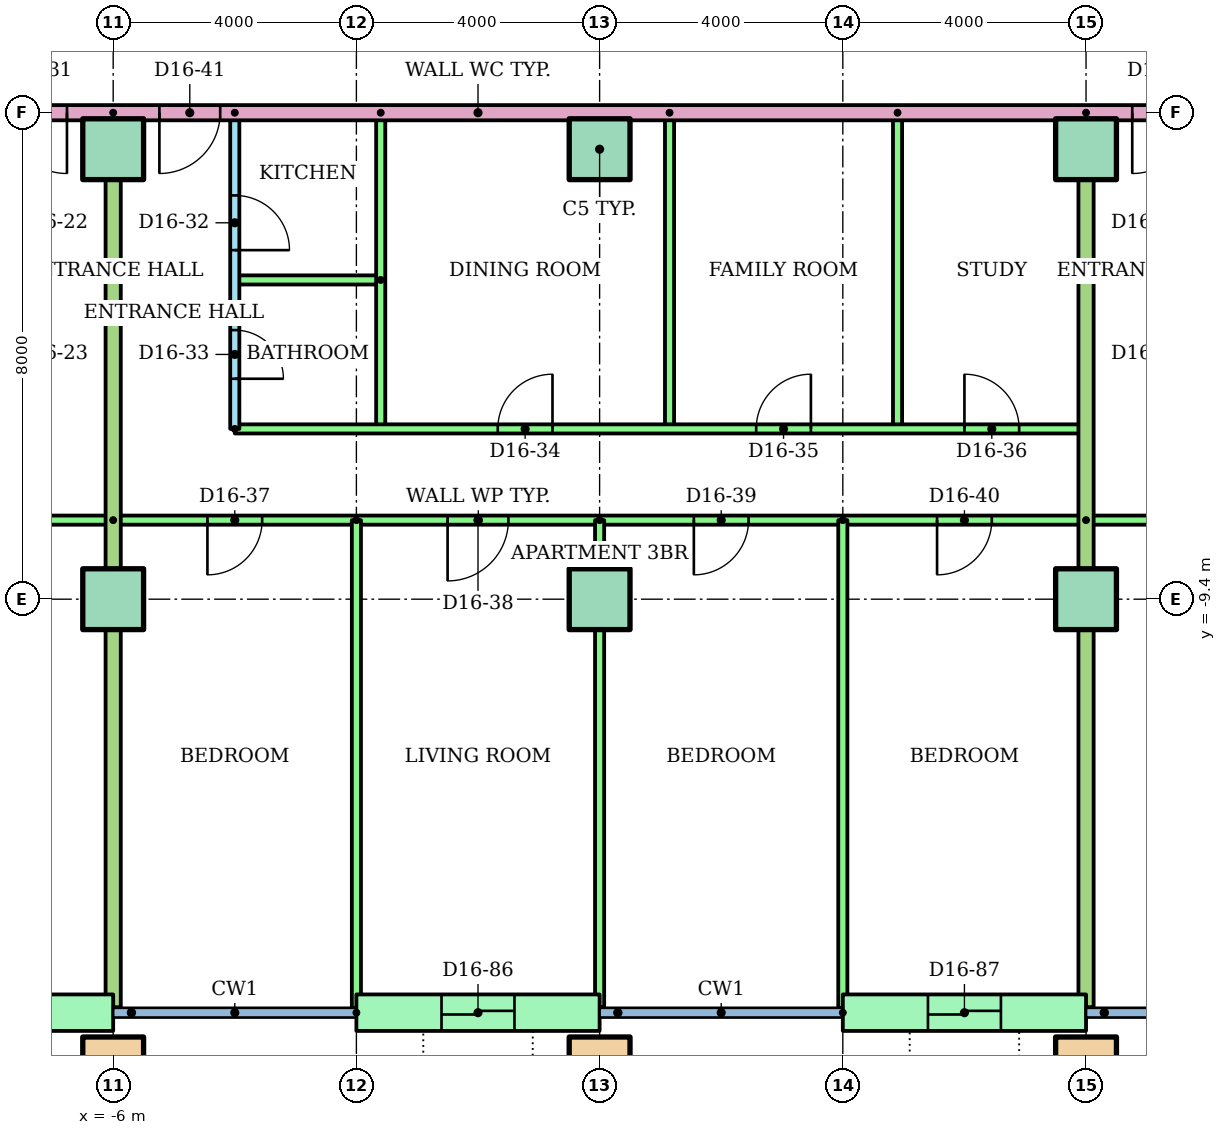
"""IFC4 building model, lengths in metres.
Left out: names, types, materials, properties, quantities, classifications, styles, units other than length and angle.
Written with IfcOpenShell. Run it as: python <this file> out.ifc"""

import sys

from ifc_helpers import new_model, si_unit, direction, frame, frame_2d, origin, origin_2d, place, context, subcontext, project, spatial, rectangle, hollow_rectangle, extrude, element, fill, save


model = new_model("IFC4")
c1 = context("Model", 3, precision=1e-05, world=origin(), true_north=direction((0.0, 1.0)))
c2 = subcontext(c1, "Body", "Model", "MODEL_VIEW")
j1 = project(units=[si_unit("LENGTHUNIT", "METRE"), si_unit("PLANEANGLEUNIT", "RADIAN")], contexts=[c1])
p1 = place(None, origin())
s1 = spatial("IfcSite", under=j1, at=p1, CompositionType="ELEMENT")
p2 = place(p1, origin())
s2 = spatial("IfcBuilding", under=s1, at=p2, CompositionType="ELEMENT")
p3 = place(p2, frame((0.0, 0.0, 60.8)))
s3 = spatial("IfcBuildingStorey", under=s2, at=p3, CompositionType="ELEMENT", Elevation=60.8)
for number, where in (
    (1, (-6.0, -17.1, 0.0)),
    (2, (2.0, -17.1, 0.0)),
    (3, (10.0, -17.1, 0.0)),
):
    element("IfcColumn", number, at=place(p3, frame(where)), inside=s3, PredefinedType="COLUMN", context=c2, shape_type="SweptSolid", body=[
        extrude(hollow_rectangle(XDim=1.0, YDim=1.0, WallThickness=0.05, at=origin_2d()), origin(), (0.0, 0.0, 1.0), 3.2),
    ])
for number, where in (
    (4, (-6.0, -9.4, 0.0)),
    (5, (2.0, -9.4, 0.0)),
    (6, (10.0, -9.4, 0.0)),
    (7, (-6.0, -2.0, 0.0)),
    (8, (2.0, -2.0, 0.0)),
    (9, (10.0, -2.0, 0.0)),
):
    element("IfcColumn", number, at=place(p3, frame(where)), inside=s3, PredefinedType="COLUMN", context=c2, shape_type="SweptSolid", body=[
        extrude(rectangle(XDim=1.0, YDim=1.0, at=origin_2d()), origin(), (0.0, 0.0, 1.0), 3.2),
    ])
p4 = place(p3, frame((-10.0, -16.2, 0.0)))
e10 = element("IfcWall", 10, at=p4, inside=s3, PredefinedType="STANDARD", context=c2, shape_type="SweptSolid", body=[
    extrude(rectangle(XDim=4.0, YDim=0.6, at=frame_2d((2.0, 0.0))), origin(), (0.0, 0.0, 1.0), 2.8),
])
p5 = place(p4, frame((1.4, 0.0, 0.0)))
e11 = element("IfcOpeningElement", 11, at=p5, cuts=e10, PredefinedType="OPENING", context=c2, shape_type="SweptSolid", body=[
    extrude(rectangle(XDim=1.2, YDim=2.1, at=frame_2d((0.6, 1.05))), frame((0.0, 0.31, 0.0), z_axis=(0.0, -1.0, 0.0), x_axis=(1.0, 0.0, 0.0)), (0.0, 0.0, 1.0), 0.62),
])
p6 = place(p3, frame((-2.0, -16.2, 0.0)))
e12 = element("IfcWall", 12, at=p6, inside=s3, PredefinedType="STANDARD", context=c2, shape_type="SweptSolid", body=[
    extrude(rectangle(XDim=4.0, YDim=0.6, at=frame_2d((2.0, 0.0))), origin(), (0.0, 0.0, 1.0), 2.8),
])
p7 = place(p6, frame((1.4, 0.0, 0.0)))
e13 = element("IfcOpeningElement", 13, at=p7, cuts=e12, PredefinedType="OPENING", context=c2, shape_type="SweptSolid", body=[
    extrude(rectangle(XDim=1.2, YDim=2.1, at=frame_2d((0.6, 1.05))), frame((0.0, 0.31, 0.0), z_axis=(0.0, -1.0, 0.0), x_axis=(1.0, 0.0, 0.0)), (0.0, 0.0, 1.0), 0.62),
])
p8 = place(p3, frame((6.0, -16.2, 0.0)))
e14 = element("IfcWall", 14, at=p8, inside=s3, PredefinedType="STANDARD", context=c2, shape_type="SweptSolid", body=[
    extrude(rectangle(XDim=4.0, YDim=0.6, at=frame_2d((2.0, 0.0))), origin(), (0.0, 0.0, 1.0), 2.8),
])
p9 = place(p8, frame((1.4, 0.0, 0.0)))
e15 = element("IfcOpeningElement", 15, at=p9, cuts=e14, PredefinedType="OPENING", context=c2, shape_type="SweptSolid", body=[
    extrude(rectangle(XDim=1.2, YDim=2.1, at=frame_2d((0.6, 1.05))), frame((0.0, 0.31, 0.0), z_axis=(0.0, -1.0, 0.0), x_axis=(1.0, 0.0, 0.0)), (0.0, 0.0, 1.0), 0.62),
])
p10 = place(p3, frame((-6.0, -8.1, 0.0), z_axis=(0.0, 0.0, 1.0), x_axis=(-1.0, 0.0, 0.0)))
e16 = element("IfcWall", 16, at=p10, inside=s3, PredefinedType="PARTITIONING", context=c2, shape_type="SweptSolid", body=[
    extrude(rectangle(XDim=16.0, YDim=0.15, at=frame_2d((8.0, 0.0))), origin(), (0.0, 0.0, 1.0), 2.4),
])
p11 = place(p10, frame((13.55, 0.0, 0.0)))
e17 = element("IfcOpeningElement", 17, at=p11, cuts=e16, PredefinedType="OPENING", context=c2, shape_type="SweptSolid", body=[
    extrude(rectangle(XDim=0.9, YDim=2.1, at=frame_2d((0.45, 1.05))), frame((0.0, 0.085, 0.0), z_axis=(0.0, -1.0, 0.0), x_axis=(1.0, 0.0, 0.0)), (0.0, 0.0, 1.0), 0.17),
])
p12 = place(p10, frame((9.5, 0.0, 0.0)))
e18 = element("IfcOpeningElement", 18, at=p12, cuts=e16, PredefinedType="OPENING", context=c2, shape_type="SweptSolid", body=[
    extrude(rectangle(XDim=1.0, YDim=2.1, at=frame_2d((0.5, 1.05))), frame((0.0, 0.085, 0.0), z_axis=(0.0, -1.0, 0.0), x_axis=(1.0, 0.0, 0.0)), (0.0, 0.0, 1.0), 0.17),
])
p13 = place(p10, frame((5.55, 0.0, 0.0)))
e19 = element("IfcOpeningElement", 19, at=p13, cuts=e16, PredefinedType="OPENING", context=c2, shape_type="SweptSolid", body=[
    extrude(rectangle(XDim=0.9, YDim=2.1, at=frame_2d((0.45, 1.05))), frame((0.0, 0.085, 0.0), z_axis=(0.0, -1.0, 0.0), x_axis=(1.0, 0.0, 0.0)), (0.0, 0.0, 1.0), 0.17),
])
p14 = place(p10, frame((1.55, 0.0, 0.0)))
e20 = element("IfcOpeningElement", 20, at=p14, cuts=e16, PredefinedType="OPENING", context=c2, shape_type="SweptSolid", body=[
    extrude(rectangle(XDim=0.9, YDim=2.1, at=frame_2d((0.45, 1.05))), frame((0.0, 0.085, 0.0), z_axis=(0.0, -1.0, 0.0), x_axis=(1.0, 0.0, 0.0)), (0.0, 0.0, 1.0), 0.17),
])
p15 = place(p3, frame((-4.0, -1.4, 0.0), z_axis=(0.0, 0.0, 1.0), x_axis=(0.0, -1.0, 0.0)))
e21 = element("IfcWall", 21, at=p15, inside=s3, PredefinedType="PARTITIONING", context=c2, shape_type="SweptSolid", body=[
    extrude(rectangle(XDim=5.2, YDim=0.15, at=frame_2d((2.6, 0.0))), origin(), (0.0, 0.0, 1.0), 2.4),
])
p16 = place(p15, frame((1.36, 0.0, 0.0)))
e22 = element("IfcOpeningElement", 22, at=p16, cuts=e21, PredefinedType="OPENING", context=c2, shape_type="SweptSolid", body=[
    extrude(rectangle(XDim=0.9, YDim=2.1, at=frame_2d((0.45, 1.05))), frame((0.0, 0.085, 0.0), z_axis=(0.0, -1.0, 0.0), x_axis=(1.0, 0.0, 0.0)), (0.0, 0.0, 1.0), 0.17),
])
p17 = place(p15, frame((3.575, 0.0, 0.0)))
e23 = element("IfcOpeningElement", 23, at=p17, cuts=e21, PredefinedType="OPENING", context=c2, shape_type="SweptSolid", body=[
    extrude(rectangle(XDim=0.8, YDim=2.1, at=frame_2d((0.4, 1.05))), frame((0.0, 0.085, 0.0), z_axis=(0.0, -1.0, 0.0), x_axis=(1.0, 0.0, 0.0)), (0.0, 0.0, 1.0), 0.17),
])
p18 = place(p3, frame((-1.6, -4.15, 0.0), z_axis=(0.0, 0.0, 1.0), x_axis=(-1.0, 0.0, 0.0)))
e24 = element("IfcWall", 24, at=p18, inside=s3, PredefinedType="PARTITIONING", context=c2, shape_type="SweptSolid", body=[
    extrude(rectangle(XDim=2.4, YDim=0.15, at=frame_2d((1.2, 0.0))), origin(), (0.0, 0.0, 1.0), 2.4),
])
for number, where, z_axis, x_axis in (
    (25, (-1.6, -1.4, 0.0), (0.0, 0.0, 1.0), (0.0, -1.0, 0.0)),
    (26, (3.15, -1.4, 0.0), (0.0, 0.0, 1.0), (0.0, -1.0, 0.0)),
    (27, (6.9, -1.4, 0.0), (0.0, 0.0, 1.0), (0.0, -1.0, 0.0)),
):
    element("IfcWall", number, at=place(p3, frame(where, z_axis=z_axis, x_axis=x_axis)), inside=s3, PredefinedType="PARTITIONING", context=c2, shape_type="SweptSolid", body=[
        extrude(rectangle(XDim=5.2, YDim=0.15, at=frame_2d((2.6, 0.0))), origin(), (0.0, 0.0, 1.0), 2.4),
    ])
p19 = place(p3, frame((-4.0, -6.6, 0.0)))
e28 = element("IfcWall", 28, at=p19, inside=s3, PredefinedType="PARTITIONING", context=c2, shape_type="SweptSolid", body=[
    extrude(rectangle(XDim=14.0, YDim=0.15, at=frame_2d((7.0, 0.0))), origin(), (0.0, 0.0, 1.0), 2.4),
])
p20 = place(p19, frame((4.325, 0.0, 0.0)))
e29 = element("IfcOpeningElement", 29, at=p20, cuts=e28, PredefinedType="OPENING", context=c2, shape_type="SweptSolid", body=[
    extrude(rectangle(XDim=0.9, YDim=2.1, at=frame_2d((0.45, 1.05))), frame((0.0, 0.085, 0.0), z_axis=(0.0, -1.0, 0.0), x_axis=(1.0, 0.0, 0.0)), (0.0, 0.0, 1.0), 0.17),
])
p21 = place(p19, frame((8.575, 0.0, 0.0)))
e30 = element("IfcOpeningElement", 30, at=p21, cuts=e28, PredefinedType="OPENING", context=c2, shape_type="SweptSolid", body=[
    extrude(rectangle(XDim=0.9, YDim=2.1, at=frame_2d((0.45, 1.05))), frame((0.0, 0.085, 0.0), z_axis=(0.0, -1.0, 0.0), x_axis=(1.0, 0.0, 0.0)), (0.0, 0.0, 1.0), 0.17),
])
p22 = place(p19, frame((12.0, 0.0, 0.0)))
e31 = element("IfcOpeningElement", 31, at=p22, cuts=e28, PredefinedType="OPENING", context=c2, shape_type="SweptSolid", body=[
    extrude(rectangle(XDim=0.9, YDim=2.1, at=frame_2d((0.45, 1.05))), frame((0.0, 0.085, 0.0), z_axis=(0.0, -1.0, 0.0), x_axis=(1.0, 0.0, 0.0)), (0.0, 0.0, 1.0), 0.17),
])
p23 = place(p3, frame((10.0, -8.1, 0.0), z_axis=(0.0, 0.0, 1.0), x_axis=(-1.0, 0.0, 0.0)))
e32 = element("IfcWall", 32, at=p23, inside=s3, PredefinedType="PARTITIONING", context=c2, shape_type="SweptSolid", body=[
    extrude(rectangle(XDim=16.0, YDim=0.15, at=frame_2d((8.0, 0.0))), origin(), (0.0, 0.0, 1.0), 2.4),
])
p24 = place(p23, frame((13.55, 0.0, 0.0)))
e33 = element("IfcOpeningElement", 33, at=p24, cuts=e32, PredefinedType="OPENING", context=c2, shape_type="SweptSolid", body=[
    extrude(rectangle(XDim=0.9, YDim=2.1, at=frame_2d((0.45, 1.05))), frame((0.0, 0.085, 0.0), z_axis=(0.0, -1.0, 0.0), x_axis=(1.0, 0.0, 0.0)), (0.0, 0.0, 1.0), 0.17),
])
p25 = place(p23, frame((9.5, 0.0, 0.0)))
e34 = element("IfcOpeningElement", 34, at=p25, cuts=e32, PredefinedType="OPENING", context=c2, shape_type="SweptSolid", body=[
    extrude(rectangle(XDim=1.0, YDim=2.1, at=frame_2d((0.5, 1.05))), frame((0.0, 0.085, 0.0), z_axis=(0.0, -1.0, 0.0), x_axis=(1.0, 0.0, 0.0)), (0.0, 0.0, 1.0), 0.17),
])
p26 = place(p23, frame((5.55, 0.0, 0.0)))
e35 = element("IfcOpeningElement", 35, at=p26, cuts=e32, PredefinedType="OPENING", context=c2, shape_type="SweptSolid", body=[
    extrude(rectangle(XDim=0.9, YDim=2.1, at=frame_2d((0.45, 1.05))), frame((0.0, 0.085, 0.0), z_axis=(0.0, -1.0, 0.0), x_axis=(1.0, 0.0, 0.0)), (0.0, 0.0, 1.0), 0.17),
])
p27 = place(p23, frame((1.55, 0.0, 0.0)))
e36 = element("IfcOpeningElement", 36, at=p27, cuts=e32, PredefinedType="OPENING", context=c2, shape_type="SweptSolid", body=[
    extrude(rectangle(XDim=0.9, YDim=2.1, at=frame_2d((0.45, 1.05))), frame((0.0, 0.085, 0.0), z_axis=(0.0, -1.0, 0.0), x_axis=(1.0, 0.0, 0.0)), (0.0, 0.0, 1.0), 0.17),
])
p28 = place(p3, frame((-2.0, -8.1, 0.0), z_axis=(0.0, 0.0, 1.0), x_axis=(0.0, -1.0, 0.0)))
e37 = element("IfcWall", 37, at=p28, inside=s3, PredefinedType="PARTITIONING", context=c2, shape_type="SweptSolid", body=[
    extrude(rectangle(XDim=8.021, YDim=0.15, at=frame_2d((4.01, 0.0))), origin(), (0.0, 0.0, 1.0), 2.4),
])
p29 = place(p3, frame((2.0, -8.1, 0.0), z_axis=(0.0, 0.0, 1.0), x_axis=(0.0, -1.0, 0.0)))
e38 = element("IfcWall", 38, at=p29, inside=s3, PredefinedType="PARTITIONING", context=c2, shape_type="SweptSolid", body=[
    extrude(rectangle(XDim=8.01, YDim=0.15, at=frame_2d((4.005, 0.0))), origin(), (0.0, 0.0, 1.0), 2.4),
])
p30 = place(p3, frame((6.0, -8.1, 0.0), z_axis=(0.0, 0.0, 1.0), x_axis=(0.0, -1.0, 0.0)))
e39 = element("IfcWall", 39, at=p30, inside=s3, PredefinedType="PARTITIONING", context=c2, shape_type="SweptSolid", body=[
    extrude(rectangle(XDim=8.021, YDim=0.15, at=frame_2d((4.01, 0.0))), origin(), (0.0, 0.0, 1.0), 2.4),
])
p31 = place(p3, frame((-6.0, -1.4, 0.0), z_axis=(0.0, 0.0, 1.0), x_axis=(0.0, -1.0, 0.0)))
e40 = element("IfcWall", 40, at=p31, inside=s3, PredefinedType="PARTITIONING", context=c2, shape_type="SweptSolid", body=[
    extrude(rectangle(XDim=14.71, YDim=0.25, at=frame_2d((7.355, 0.0))), origin(), (0.0, 0.0, 1.0), 2.4),
])
p32 = place(p3, frame((26.0, -8.1, 0.0), z_axis=(0.0, 0.0, 1.0), x_axis=(-1.0, 0.0, 0.0)))
e41 = element("IfcWall", 41, at=p32, inside=s3, PredefinedType="PARTITIONING", context=c2, shape_type="SweptSolid", body=[
    extrude(rectangle(XDim=16.0, YDim=0.15, at=frame_2d((8.0, 0.0))), origin(), (0.0, 0.0, 1.0), 2.4),
])
p33 = place(p32, frame((13.55, 0.0, 0.0)))
e42 = element("IfcOpeningElement", 42, at=p33, cuts=e41, PredefinedType="OPENING", context=c2, shape_type="SweptSolid", body=[
    extrude(rectangle(XDim=0.9, YDim=2.1, at=frame_2d((0.45, 1.05))), frame((0.0, 0.085, 0.0), z_axis=(0.0, -1.0, 0.0), x_axis=(1.0, 0.0, 0.0)), (0.0, 0.0, 1.0), 0.17),
])
p34 = place(p32, frame((9.55, 0.0, 0.0)))
e43 = element("IfcOpeningElement", 43, at=p34, cuts=e41, PredefinedType="OPENING", context=c2, shape_type="SweptSolid", body=[
    extrude(rectangle(XDim=0.9, YDim=2.1, at=frame_2d((0.45, 1.05))), frame((0.0, 0.085, 0.0), z_axis=(0.0, -1.0, 0.0), x_axis=(1.0, 0.0, 0.0)), (0.0, 0.0, 1.0), 0.17),
])
p35 = place(p32, frame((3.5, 0.0, 0.0)))
e44 = element("IfcOpeningElement", 44, at=p35, cuts=e41, PredefinedType="OPENING", context=c2, shape_type="SweptSolid", body=[
    extrude(rectangle(XDim=1.0, YDim=2.1, at=frame_2d((0.5, 1.05))), frame((0.0, 0.085, 0.0), z_axis=(0.0, -1.0, 0.0), x_axis=(1.0, 0.0, 0.0)), (0.0, 0.0, 1.0), 0.17),
])
p36 = place(p3, frame((10.0, -1.4, 0.0), z_axis=(0.0, 0.0, 1.0), x_axis=(0.0, -1.0, 0.0)))
e45 = element("IfcWall", 45, at=p36, inside=s3, PredefinedType="PARTITIONING", context=c2, shape_type="SweptSolid", body=[
    extrude(rectangle(XDim=14.71, YDim=0.25, at=frame_2d((7.355, 0.0))), origin(), (0.0, 0.0, 1.0), 2.4),
])
p37 = place(p3, frame((14.0, -1.4, 0.0), z_axis=(0.0, 0.0, 1.0), x_axis=(-1.0, 0.0, 0.0)))
e46 = element("IfcWall", 46, at=p37, inside=s3, PredefinedType="PARTITIONING", context=c2, shape_type="SweptSolid", body=[
    extrude(rectangle(XDim=28.0, YDim=0.25, at=frame_2d((14.0, 0.0))), origin(), (0.0, 0.0, 1.0), 2.4),
])
p38 = place(p37, frame((20.76, 0.0, 0.0)))
e47 = element("IfcOpeningElement", 47, at=p38, cuts=e46, PredefinedType="OPENING", context=c2, shape_type="SweptSolid", body=[
    extrude(rectangle(XDim=1.0, YDim=2.1, at=frame_2d((0.5, 1.05))), frame((0.0, 0.135, 0.0), z_axis=(0.0, -1.0, 0.0), x_axis=(1.0, 0.0, 0.0)), (0.0, 0.0, 1.0), 0.27),
])
p39 = place(p37, frame((18.24, 0.0, 0.0)))
e48 = element("IfcOpeningElement", 48, at=p39, cuts=e46, PredefinedType="OPENING", context=c2, shape_type="SweptSolid", body=[
    extrude(rectangle(XDim=1.0, YDim=2.1, at=frame_2d((0.5, 1.05))), frame((0.0, 0.135, 0.0), z_axis=(0.0, -1.0, 0.0), x_axis=(1.0, 0.0, 0.0)), (0.0, 0.0, 1.0), 0.27),
])
p40 = place(p37, frame((2.24, 0.0, 0.0)))
e49 = element("IfcOpeningElement", 49, at=p40, cuts=e46, PredefinedType="OPENING", context=c2, shape_type="SweptSolid", body=[
    extrude(rectangle(XDim=1.0, YDim=2.1, at=frame_2d((0.5, 1.05))), frame((0.0, 0.135, 0.0), z_axis=(0.0, -1.0, 0.0), x_axis=(1.0, 0.0, 0.0)), (0.0, 0.0, 1.0), 0.27),
])
p41 = place(p38, origin())
e50 = element("IfcDoor", 50, at=p41, inside=s3, OperationType="SINGLE_SWING_LEFT", PredefinedType="DOOR", context=c2, shape_type="SweptSolid", body=[
    extrude(rectangle(XDim=1.0, YDim=2.1, at=frame_2d((0.5, 1.05))), frame((0.0, 0.025, 0.0), z_axis=(0.0, -1.0, 0.0), x_axis=(1.0, 0.0, 0.0)), (0.0, 0.0, 1.0), 0.05),
])
fill(e47, e50)
p42 = place(p16, origin())
e51 = element("IfcDoor", 51, at=p42, inside=s3, OperationType="SINGLE_SWING_RIGHT", PredefinedType="DOOR", context=c2, shape_type="SweptSolid", body=[
    extrude(rectangle(XDim=0.9, YDim=2.1, at=frame_2d((0.45, 1.05))), frame((0.0, 0.025, 0.0), z_axis=(0.0, -1.0, 0.0), x_axis=(1.0, 0.0, 0.0)), (0.0, 0.0, 1.0), 0.05),
])
fill(e22, e51)
p43 = place(p17, origin())
e52 = element("IfcDoor", 52, at=p43, inside=s3, OperationType="SINGLE_SWING_RIGHT", PredefinedType="DOOR", context=c2, shape_type="SweptSolid", body=[
    extrude(rectangle(XDim=0.8, YDim=2.1, at=frame_2d((0.4, 1.05))), frame((0.0, 0.025, 0.0), z_axis=(0.0, -1.0, 0.0), x_axis=(1.0, 0.0, 0.0)), (0.0, 0.0, 1.0), 0.05),
])
fill(e23, e52)
p44 = place(p20, origin())
e53 = element("IfcDoor", 53, at=p44, inside=s3, OperationType="SINGLE_SWING_RIGHT", PredefinedType="DOOR", context=c2, shape_type="SweptSolid", body=[
    extrude(rectangle(XDim=0.9, YDim=2.1, at=frame_2d((0.45, 1.05))), frame((0.0, 0.025, 0.0), z_axis=(0.0, -1.0, 0.0), x_axis=(1.0, 0.0, 0.0)), (0.0, 0.0, 1.0), 0.05),
])
fill(e29, e53)
p45 = place(p21, origin())
e54 = element("IfcDoor", 54, at=p45, inside=s3, OperationType="SINGLE_SWING_RIGHT", PredefinedType="DOOR", context=c2, shape_type="SweptSolid", body=[
    extrude(rectangle(XDim=0.9, YDim=2.1, at=frame_2d((0.45, 1.05))), frame((0.0, 0.025, 0.0), z_axis=(0.0, -1.0, 0.0), x_axis=(1.0, 0.0, 0.0)), (0.0, 0.0, 1.0), 0.05),
])
fill(e30, e54)
p46 = place(p22, origin())
e55 = element("IfcDoor", 55, at=p46, inside=s3, OperationType="SINGLE_SWING_LEFT", PredefinedType="DOOR", context=c2, shape_type="SweptSolid", body=[
    extrude(rectangle(XDim=0.9, YDim=2.1, at=frame_2d((0.45, 1.05))), frame((0.0, 0.025, 0.0), z_axis=(0.0, -1.0, 0.0), x_axis=(1.0, 0.0, 0.0)), (0.0, 0.0, 1.0), 0.05),
])
fill(e31, e55)
p47 = place(p24, origin())
e56 = element("IfcDoor", 56, at=p47, inside=s3, OperationType="SINGLE_SWING_RIGHT", PredefinedType="DOOR", context=c2, shape_type="SweptSolid", body=[
    extrude(rectangle(XDim=0.9, YDim=2.1, at=frame_2d((0.45, 1.05))), frame((0.0, 0.025, 0.0), z_axis=(0.0, -1.0, 0.0), x_axis=(1.0, 0.0, 0.0)), (0.0, 0.0, 1.0), 0.05),
])
fill(e33, e56)
p48 = place(p25, origin())
e57 = element("IfcDoor", 57, at=p48, inside=s3, OperationType="SINGLE_SWING_RIGHT", PredefinedType="DOOR", context=c2, shape_type="SweptSolid", body=[
    extrude(rectangle(XDim=1.0, YDim=2.1, at=frame_2d((0.5, 1.05))), frame((0.0, 0.025, 0.0), z_axis=(0.0, -1.0, 0.0), x_axis=(1.0, 0.0, 0.0)), (0.0, 0.0, 1.0), 0.05),
])
fill(e34, e57)
p49 = place(p26, origin())
e58 = element("IfcDoor", 58, at=p49, inside=s3, OperationType="SINGLE_SWING_RIGHT", PredefinedType="DOOR", context=c2, shape_type="SweptSolid", body=[
    extrude(rectangle(XDim=0.9, YDim=2.1, at=frame_2d((0.45, 1.05))), frame((0.0, 0.025, 0.0), z_axis=(0.0, -1.0, 0.0), x_axis=(1.0, 0.0, 0.0)), (0.0, 0.0, 1.0), 0.05),
])
fill(e35, e58)
p50 = place(p27, origin())
e59 = element("IfcDoor", 59, at=p50, inside=s3, OperationType="SINGLE_SWING_RIGHT", PredefinedType="DOOR", context=c2, shape_type="SweptSolid", body=[
    extrude(rectangle(XDim=0.9, YDim=2.1, at=frame_2d((0.45, 1.05))), frame((0.0, 0.025, 0.0), z_axis=(0.0, -1.0, 0.0), x_axis=(1.0, 0.0, 0.0)), (0.0, 0.0, 1.0), 0.05),
])
fill(e36, e59)
p51 = place(p39, origin())
e60 = element("IfcDoor", 60, at=p51, inside=s3, OperationType="SINGLE_SWING_RIGHT", PredefinedType="DOOR", context=c2, shape_type="SweptSolid", body=[
    extrude(rectangle(XDim=1.0, YDim=2.1, at=frame_2d((0.5, 1.05))), frame((0.0, 0.025, 0.0), z_axis=(0.0, -1.0, 0.0), x_axis=(1.0, 0.0, 0.0)), (0.0, 0.0, 1.0), 0.05),
])
fill(e48, e60)
p52 = place(p40, origin())
e61 = element("IfcDoor", 61, at=p52, inside=s3, OperationType="SINGLE_SWING_RIGHT", PredefinedType="DOOR", context=c2, shape_type="SweptSolid", body=[
    extrude(rectangle(XDim=1.0, YDim=2.1, at=frame_2d((0.5, 1.05))), frame((0.0, 0.025, 0.0), z_axis=(0.0, -1.0, 0.0), x_axis=(1.0, 0.0, 0.0)), (0.0, 0.0, 1.0), 0.05),
])
fill(e49, e61)
p53 = place(p7, origin())
e62 = element("IfcDoor", 62, at=p53, inside=s3, OperationType="SLIDING_TO_LEFT", PredefinedType="DOOR", context=c2, shape_type="SweptSolid", body=[
    extrude(rectangle(XDim=1.2, YDim=2.1, at=frame_2d((0.6, 1.05))), frame((0.0, 0.025, 0.0), z_axis=(0.0, -1.0, 0.0), x_axis=(1.0, 0.0, 0.0)), (0.0, 0.0, 1.0), 0.05),
])
fill(e13, e62)
p54 = place(p9, origin())
e63 = element("IfcDoor", 63, at=p54, inside=s3, OperationType="SLIDING_TO_LEFT", PredefinedType="DOOR", context=c2, shape_type="SweptSolid", body=[
    extrude(rectangle(XDim=1.2, YDim=2.1, at=frame_2d((0.6, 1.05))), frame((0.0, 0.025, 0.0), z_axis=(0.0, -1.0, 0.0), x_axis=(1.0, 0.0, 0.0)), (0.0, 0.0, 1.0), 0.05),
])
fill(e15, e63)
save(model, sys.argv[1])
